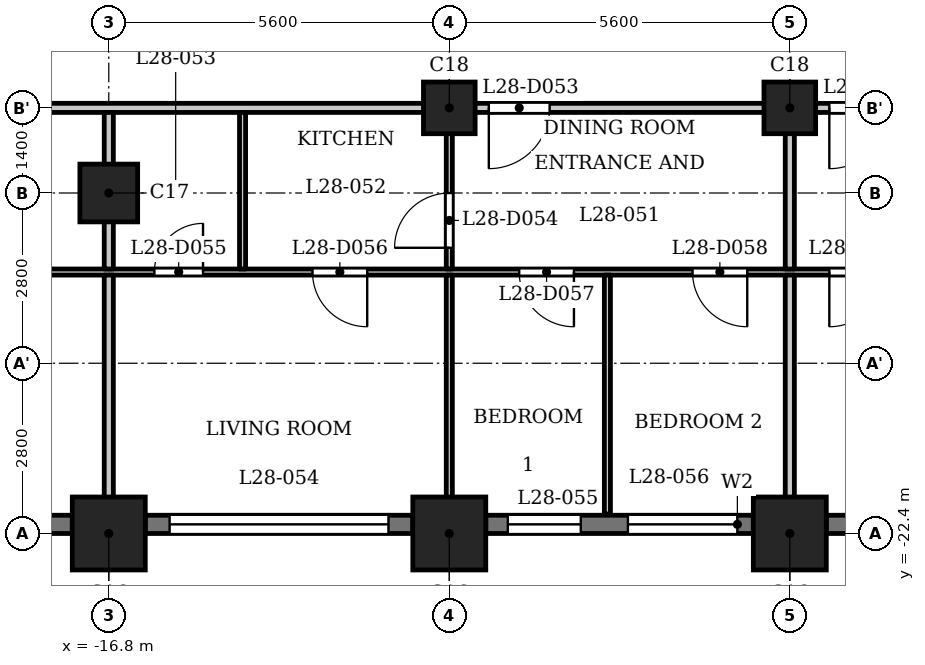
"""IFC4 building model, lengths in metres.
Left out: names, types, materials, properties, quantities, classifications, styles, units other than length and angle.
Written with IfcOpenShell. Run it as: python <this file> out.ifc"""

import sys

from ifc_helpers import new_model, si_unit, direction, frame, frame_2d, origin, origin_2d, place, context, subcontext, project, spatial, rectangle, extrude, element, fill, save


model = new_model("IFC4")
c1 = context("Model", 3, precision=1e-05, world=origin(), true_north=direction((0.0, 1.0)))
c2 = subcontext(c1, "Body", "Model", "MODEL_VIEW")
j1 = project(units=[si_unit("LENGTHUNIT", "METRE"), si_unit("PLANEANGLEUNIT", "RADIAN")], contexts=[c1])
p1 = place(None, origin())
s1 = spatial("IfcSite", under=j1, at=p1, CompositionType="ELEMENT")
p2 = place(p1, origin())
s2 = spatial("IfcBuilding", under=s1, at=p2, CompositionType="ELEMENT")
p3 = place(p2, frame((0.0, 0.0, 111.3)))
s3 = spatial("IfcBuildingStorey", under=s2, at=p3, CompositionType="ELEMENT", Elevation=111.3)
for number, where, z_axis, x_axis in (
    (1, (-16.8, -22.4, 0.0), (0.0, 0.0, 1.0), (1.0, 0.0, 0.0)),
    (2, (-11.2, -22.4, 0.0), (0.0, 0.0, 1.0), (1.0, 0.0, 0.0)),
    (3, (-5.6, -22.4, 0.0), (0.0, 0.0, 1.0), (1.0, 0.0, 0.0)),
):
    element("IfcColumn", number, at=place(p3, frame(where, z_axis=z_axis, x_axis=x_axis)), inside=s3, PredefinedType="COLUMN", context=c2, shape_type="SweptSolid", body=[
        extrude(rectangle(XDim=1.2, YDim=1.2, at=origin_2d()), origin(), (0.0, 0.0, 1.0), 3.5),
    ])
p4 = place(p3, frame((-16.8, -16.8, 0.0), z_axis=(0.0, 0.0, 1.0), x_axis=(1.0, 0.0, 0.0)))
e4 = element("IfcColumn", 4, at=p4, inside=s3, PredefinedType="COLUMN", context=c2, shape_type="SweptSolid", body=[
    extrude(rectangle(XDim=0.95, YDim=0.95, at=origin_2d()), origin(), (0.0, 0.0, 1.0), 3.5),
])
for number, where, z_axis, x_axis in (
    (5, (-11.2, -15.4, 0.0), (0.0, 0.0, 1.0), (1.0, 0.0, 0.0)),
    (6, (-5.6, -15.4, 0.0), (0.0, 0.0, 1.0), (1.0, 0.0, 0.0)),
):
    element("IfcColumn", number, at=place(p3, frame(where, z_axis=z_axis, x_axis=x_axis)), inside=s3, PredefinedType="COLUMN", context=c2, shape_type="SweptSolid", body=[
        extrude(rectangle(XDim=0.85, YDim=0.85, at=origin_2d()), origin(), (0.0, 0.0, 1.0), 3.5),
    ])
p5 = place(p3, frame((-20.0, -22.25, 0.0), z_axis=(0.0, 0.0, 1.0), x_axis=(1.0, 0.0, 0.0)))
e7 = element("IfcWall", 7, at=p5, inside=s3, PredefinedType="SOLIDWALL", context=c2, shape_type="SweptSolid", body=[
    extrude(rectangle(XDim=2.6, YDim=0.3, at=frame_2d((1.3, 0.0))), origin(), (0.0, 0.0, 1.0), 2.4),
])
p6 = place(p5, frame((0.7, 0.0, 0.6)))
e8 = element("IfcOpeningElement", 8, at=p6, cuts=e7, PredefinedType="OPENING", context=c2, shape_type="SweptSolid", body=[
    extrude(rectangle(XDim=1.2, YDim=1.55, at=frame_2d((0.6, 0.775))), frame((0.0, 0.16, 0.0), z_axis=(0.0, -1.0, 0.0), x_axis=(1.0, 0.0, 0.0)), (0.0, 0.0, 1.0), 0.32),
])
p7 = place(p3, frame((-16.2, -22.25, 0.0), z_axis=(0.0, 0.0, 1.0), x_axis=(1.0, 0.0, 0.0)))
e9 = element("IfcWall", 9, at=p7, inside=s3, PredefinedType="SOLIDWALL", context=c2, shape_type="SweptSolid", body=[
    extrude(rectangle(XDim=4.4, YDim=0.3, at=frame_2d((2.2, 0.0))), origin(), (0.0, 0.0, 1.0), 2.4),
])
p8 = place(p7, frame((0.4, 0.0, 1.2)))
e10 = element("IfcOpeningElement", 10, at=p8, cuts=e9, PredefinedType="OPENING", context=c2, shape_type="SweptSolid", body=[
    extrude(rectangle(XDim=3.6, YDim=0.95, at=frame_2d((1.8, 0.475))), frame((0.0, 0.16, 0.0), z_axis=(0.0, -1.0, 0.0), x_axis=(1.0, 0.0, 0.0)), (0.0, 0.0, 1.0), 0.32),
])
p9 = place(p3, frame((-10.6, -22.25, 0.0), z_axis=(0.0, 0.0, 1.0), x_axis=(1.0, 0.0, 0.0)))
e11 = element("IfcWall", 11, at=p9, inside=s3, PredefinedType="SOLIDWALL", context=c2, shape_type="SweptSolid", body=[
    extrude(rectangle(XDim=4.4, YDim=0.3, at=frame_2d((2.2, 0.0))), origin(), (0.0, 0.0, 1.0), 2.4),
])
p10 = place(p9, frame((0.363, 0.0, 0.6)))
e12 = element("IfcOpeningElement", 12, at=p10, cuts=e11, PredefinedType="OPENING", context=c2, shape_type="SweptSolid", body=[
    extrude(rectangle(XDim=1.2, YDim=1.55, at=frame_2d((0.6, 0.775))), frame((0.0, 0.16, 0.0), z_axis=(0.0, -1.0, 0.0), x_axis=(1.0, 0.0, 0.0)), (0.0, 0.0, 1.0), 0.32),
])
p11 = place(p9, frame((2.337, 0.0, 0.9)))
e13 = element("IfcOpeningElement", 13, at=p11, cuts=e11, PredefinedType="OPENING", context=c2, shape_type="SweptSolid", body=[
    extrude(rectangle(XDim=1.8, YDim=1.25, at=frame_2d((0.9, 0.625))), frame((0.0, 0.16, 0.0), z_axis=(0.0, -1.0, 0.0), x_axis=(1.0, 0.0, 0.0)), (0.0, 0.0, 1.0), 0.32),
])
p12 = place(p3, frame((-5.0, -22.25, 0.0), z_axis=(0.0, 0.0, 1.0), x_axis=(1.0, 0.0, 0.0)))
e14 = element("IfcWall", 14, at=p12, inside=s3, PredefinedType="SOLIDWALL", context=c2, shape_type="SweptSolid", body=[
    extrude(rectangle(XDim=4.4, YDim=0.3, at=frame_2d((2.2, 0.0))), origin(), (0.0, 0.0, 1.0), 2.4),
])
p13 = place(p12, frame((0.4, 0.0, 1.2)))
e15 = element("IfcOpeningElement", 15, at=p13, cuts=e14, PredefinedType="OPENING", context=c2, shape_type="SweptSolid", body=[
    extrude(rectangle(XDim=3.6, YDim=0.95, at=frame_2d((1.8, 0.475))), frame((0.0, 0.16, 0.0), z_axis=(0.0, -1.0, 0.0), x_axis=(1.0, 0.0, 0.0)), (0.0, 0.0, 1.0), 0.32),
])
p14 = place(p3, frame((-26.19, -18.1, 0.0), z_axis=(0.0, 0.0, 1.0), x_axis=(1.0, 0.0, 0.0)))
e16 = element("IfcWall", 16, at=p14, inside=s3, PredefinedType="PARTITIONING", context=c2, shape_type="SweptSolid", body=[
    extrude(rectangle(XDim=52.63, YDim=0.1, at=frame_2d((26.315, 0.0))), origin(), (0.0, 0.0, 1.0), 3.2),
])
p15 = place(p14, frame((1.09, 0.0, 0.0)))
e17 = element("IfcOpeningElement", 17, at=p15, cuts=e16, PredefinedType="OPENING", context=c2, shape_type="SweptSolid", body=[
    extrude(rectangle(XDim=0.8, YDim=2.1, at=frame_2d((0.4, 1.05))), frame((0.0, 0.06, 0.0), z_axis=(0.0, -1.0, 0.0), x_axis=(1.0, 0.0, 0.0)), (0.0, 0.0, 1.0), 0.12),
])
p16 = place(p14, frame((4.44, 0.0, 0.0)))
e18 = element("IfcOpeningElement", 18, at=p16, cuts=e16, PredefinedType="OPENING", context=c2, shape_type="SweptSolid", body=[
    extrude(rectangle(XDim=0.9, YDim=2.1, at=frame_2d((0.45, 1.05))), frame((0.0, 0.06, 0.0), z_axis=(0.0, -1.0, 0.0), x_axis=(1.0, 0.0, 0.0)), (0.0, 0.0, 1.0), 0.12),
])
p17 = place(p14, frame((10.14, 0.0, 0.0)))
e19 = element("IfcOpeningElement", 19, at=p17, cuts=e16, PredefinedType="OPENING", context=c2, shape_type="SweptSolid", body=[
    extrude(rectangle(XDim=0.8, YDim=2.1, at=frame_2d((0.4, 1.05))), frame((0.0, 0.06, 0.0), z_axis=(0.0, -1.0, 0.0), x_axis=(1.0, 0.0, 0.0)), (0.0, 0.0, 1.0), 0.12),
])
p18 = place(p14, frame((12.74, 0.0, 0.0)))
e20 = element("IfcOpeningElement", 20, at=p18, cuts=e16, PredefinedType="OPENING", context=c2, shape_type="SweptSolid", body=[
    extrude(rectangle(XDim=0.9, YDim=2.1, at=frame_2d((0.45, 1.05))), frame((0.0, 0.06, 0.0), z_axis=(0.0, -1.0, 0.0), x_axis=(1.0, 0.0, 0.0)), (0.0, 0.0, 1.0), 0.12),
])
p19 = place(p14, frame((16.14, 0.0, 0.0)))
e21 = element("IfcOpeningElement", 21, at=p19, cuts=e16, PredefinedType="OPENING", context=c2, shape_type="SweptSolid", body=[
    extrude(rectangle(XDim=0.9, YDim=2.1, at=frame_2d((0.45, 1.05))), frame((0.0, 0.06, 0.0), z_axis=(0.0, -1.0, 0.0), x_axis=(1.0, 0.0, 0.0)), (0.0, 0.0, 1.0), 0.12),
])
p20 = place(p14, frame((18.99, 0.0, 0.0)))
e22 = element("IfcOpeningElement", 22, at=p20, cuts=e16, PredefinedType="OPENING", context=c2, shape_type="SweptSolid", body=[
    extrude(rectangle(XDim=0.9, YDim=2.1, at=frame_2d((0.45, 1.05))), frame((0.0, 0.06, 0.0), z_axis=(0.0, -1.0, 0.0), x_axis=(1.0, 0.0, 0.0)), (0.0, 0.0, 1.0), 0.12),
])
p21 = place(p14, frame((26.84, 0.0, 0.0)))
e23 = element("IfcOpeningElement", 23, at=p21, cuts=e16, PredefinedType="OPENING", context=c2, shape_type="SweptSolid", body=[
    extrude(rectangle(XDim=0.8, YDim=2.1, at=frame_2d((0.4, 1.05))), frame((0.0, 0.06, 0.0), z_axis=(0.0, -1.0, 0.0), x_axis=(1.0, 0.0, 0.0)), (0.0, 0.0, 1.0), 0.12),
])
p22 = place(p14, frame((21.24, 0.0, 0.0)))
e24 = element("IfcOpeningElement", 24, at=p22, cuts=e16, PredefinedType="OPENING", context=c2, shape_type="SweptSolid", body=[
    extrude(rectangle(XDim=0.9, YDim=2.1, at=frame_2d((0.45, 1.05))), frame((0.0, 0.06, 0.0), z_axis=(0.0, -1.0, 0.0), x_axis=(1.0, 0.0, 0.0)), (0.0, 0.0, 1.0), 0.12),
])
p23 = place(p14, frame((32.54, 0.0, 0.0)))
e25 = element("IfcOpeningElement", 25, at=p23, cuts=e16, PredefinedType="OPENING", context=c2, shape_type="SweptSolid", body=[
    extrude(rectangle(XDim=0.8, YDim=2.1, at=frame_2d((0.4, 1.05))), frame((0.0, 0.06, 0.0), z_axis=(0.0, -1.0, 0.0), x_axis=(1.0, 0.0, 0.0)), (0.0, 0.0, 1.0), 0.12),
])
p24 = place(p14, frame((35.14, 0.0, 0.0)))
e26 = element("IfcOpeningElement", 26, at=p24, cuts=e16, PredefinedType="OPENING", context=c2, shape_type="SweptSolid", body=[
    extrude(rectangle(XDim=0.9, YDim=2.1, at=frame_2d((0.45, 1.05))), frame((0.0, 0.06, 0.0), z_axis=(0.0, -1.0, 0.0), x_axis=(1.0, 0.0, 0.0)), (0.0, 0.0, 1.0), 0.12),
])
p25 = place(p14, frame((38.54, 0.0, 0.0)))
e27 = element("IfcOpeningElement", 27, at=p25, cuts=e16, PredefinedType="OPENING", context=c2, shape_type="SweptSolid", body=[
    extrude(rectangle(XDim=0.9, YDim=2.1, at=frame_2d((0.45, 1.05))), frame((0.0, 0.06, 0.0), z_axis=(0.0, -1.0, 0.0), x_axis=(1.0, 0.0, 0.0)), (0.0, 0.0, 1.0), 0.12),
])
p26 = place(p14, frame((41.39, 0.0, 0.0)))
e28 = element("IfcOpeningElement", 28, at=p26, cuts=e16, PredefinedType="OPENING", context=c2, shape_type="SweptSolid", body=[
    extrude(rectangle(XDim=0.9, YDim=2.1, at=frame_2d((0.45, 1.05))), frame((0.0, 0.06, 0.0), z_axis=(0.0, -1.0, 0.0), x_axis=(1.0, 0.0, 0.0)), (0.0, 0.0, 1.0), 0.12),
])
p27 = place(p14, frame((49.204, 0.0, 0.0)))
e29 = element("IfcOpeningElement", 29, at=p27, cuts=e16, PredefinedType="OPENING", context=c2, shape_type="SweptSolid", body=[
    extrude(rectangle(XDim=0.8, YDim=2.1, at=frame_2d((0.4, 1.05))), frame((0.0, 0.06, 0.0), z_axis=(0.0, -1.0, 0.0), x_axis=(1.0, 0.0, 0.0)), (0.0, 0.0, 1.0), 0.12),
])
p28 = place(p14, frame((43.64, 0.0, 0.0)))
e30 = element("IfcOpeningElement", 30, at=p28, cuts=e16, PredefinedType="OPENING", context=c2, shape_type="SweptSolid", body=[
    extrude(rectangle(XDim=0.9, YDim=2.1, at=frame_2d((0.45, 1.05))), frame((0.0, 0.06, 0.0), z_axis=(0.0, -1.0, 0.0), x_axis=(1.0, 0.0, 0.0)), (0.0, 0.0, 1.0), 0.12),
])
p29 = place(p3, frame((-27.484, -15.4, 0.0), z_axis=(0.0, 0.0, 1.0), x_axis=(1.0, 0.0, 0.0)))
e31 = element("IfcWall", 31, at=p29, inside=s3, PredefinedType="PARTITIONING", context=c2, shape_type="SweptSolid", body=[
    extrude(rectangle(XDim=54.968, YDim=0.15, at=frame_2d((27.484, 0.0))), origin(), (0.0, 0.0, 1.0), 3.2),
])
p30 = place(p29, frame((5.734, 0.0, 0.0)))
e32 = element("IfcOpeningElement", 32, at=p30, cuts=e31, PredefinedType="OPENING", context=c2, shape_type="SweptSolid", body=[
    extrude(rectangle(XDim=1.0, YDim=2.1, at=frame_2d((0.5, 1.05))), frame((0.0, 0.085, 0.0), z_axis=(0.0, -1.0, 0.0), x_axis=(1.0, 0.0, 0.0)), (0.0, 0.0, 1.0), 0.17),
])
p31 = place(p29, frame((16.934, 0.0, 0.0)))
e33 = element("IfcOpeningElement", 33, at=p31, cuts=e31, PredefinedType="OPENING", context=c2, shape_type="SweptSolid", body=[
    extrude(rectangle(XDim=1.0, YDim=2.1, at=frame_2d((0.5, 1.05))), frame((0.0, 0.085, 0.0), z_axis=(0.0, -1.0, 0.0), x_axis=(1.0, 0.0, 0.0)), (0.0, 0.0, 1.0), 0.17),
])
p32 = place(p29, frame((22.534, 0.0, 0.0)))
e34 = element("IfcOpeningElement", 34, at=p32, cuts=e31, PredefinedType="OPENING", context=c2, shape_type="SweptSolid", body=[
    extrude(rectangle(XDim=1.0, YDim=2.1, at=frame_2d((0.5, 1.05))), frame((0.0, 0.085, 0.0), z_axis=(0.0, -1.0, 0.0), x_axis=(1.0, 0.0, 0.0)), (0.0, 0.0, 1.0), 0.17),
])
p33 = place(p29, frame((39.334, 0.0, 0.0)))
e35 = element("IfcOpeningElement", 35, at=p33, cuts=e31, PredefinedType="OPENING", context=c2, shape_type="SweptSolid", body=[
    extrude(rectangle(XDim=1.0, YDim=2.1, at=frame_2d((0.5, 1.05))), frame((0.0, 0.085, 0.0), z_axis=(0.0, -1.0, 0.0), x_axis=(1.0, 0.0, 0.0)), (0.0, 0.0, 1.0), 0.17),
])
p34 = place(p29, frame((44.934, 0.0, 0.0)))
e36 = element("IfcOpeningElement", 36, at=p34, cuts=e31, PredefinedType="OPENING", context=c2, shape_type="SweptSolid", body=[
    extrude(rectangle(XDim=1.0, YDim=2.1, at=frame_2d((0.5, 1.05))), frame((0.0, 0.085, 0.0), z_axis=(0.0, -1.0, 0.0), x_axis=(1.0, 0.0, 0.0)), (0.0, 0.0, 1.0), 0.17),
])
p35 = place(p3, frame((-16.8, -22.98, 0.0), z_axis=(0.0, 0.0, 1.0), x_axis=(0.0, 1.0, 0.0)))
e37 = element("IfcWall", 37, at=p35, inside=s3, PredefinedType="PARTITIONING", context=c2, shape_type="SweptSolid", body=[
    extrude(rectangle(XDim=4.83, YDim=0.15, at=frame_2d((2.415, 0.0))), origin(), (0.0, 0.0, 1.0), 3.2),
])
p36 = place(p3, frame((-16.8, -18.05, 0.0), z_axis=(0.0, 0.0, 1.0), x_axis=(0.0, 1.0, 0.0)))
e38 = element("IfcWall", 38, at=p36, inside=s3, PredefinedType="PARTITIONING", context=c2, shape_type="SweptSolid", body=[
    extrude(rectangle(XDim=2.575, YDim=0.15, at=frame_2d((1.288, 0.0))), origin(), (0.0, 0.0, 1.0), 3.2),
])
p37 = place(p3, frame((-14.6, -18.05, 0.0), z_axis=(0.0, 0.0, 1.0), x_axis=(0.0, 1.0, 0.0)))
e39 = element("IfcWall", 39, at=p37, inside=s3, PredefinedType="PARTITIONING", context=c2, shape_type="SweptSolid", body=[
    extrude(rectangle(XDim=2.575, YDim=0.1, at=frame_2d((1.288, 0.0))), origin(), (0.0, 0.0, 1.0), 3.2),
])
p38 = place(p3, frame((-11.2, -22.98, 0.0), z_axis=(0.0, 0.0, 1.0), x_axis=(0.0, 1.0, 0.0)))
e40 = element("IfcWall", 40, at=p38, inside=s3, PredefinedType="PARTITIONING", context=c2, shape_type="SweptSolid", body=[
    extrude(rectangle(XDim=4.83, YDim=0.1, at=frame_2d((2.415, 0.0))), origin(), (0.0, 0.0, 1.0), 3.2),
])
p39 = place(p3, frame((-11.2, -18.05, 0.0), z_axis=(0.0, 0.0, 1.0), x_axis=(0.0, 1.0, 0.0)))
e41 = element("IfcWall", 41, at=p39, inside=s3, PredefinedType="PARTITIONING", context=c2, shape_type="SweptSolid", body=[
    extrude(rectangle(XDim=2.575, YDim=0.1, at=frame_2d((1.288, 0.0))), origin(), (0.0, 0.0, 1.0), 3.2),
])
p40 = place(p39, frame((0.349, 0.0, 0.0)))
e42 = element("IfcOpeningElement", 42, at=p40, cuts=e41, PredefinedType="OPENING", context=c2, shape_type="SweptSolid", body=[
    extrude(rectangle(XDim=0.9, YDim=2.1, at=frame_2d((0.45, 1.05))), frame((0.0, 0.06, 0.0), z_axis=(0.0, -1.0, 0.0), x_axis=(1.0, 0.0, 0.0)), (0.0, 0.0, 1.0), 0.12),
])
p41 = place(p3, frame((-8.6, -22.08, 0.0), z_axis=(0.0, 0.0, 1.0), x_axis=(0.0, 1.0, 0.0)))
e43 = element("IfcWall", 43, at=p41, inside=s3, PredefinedType="PARTITIONING", context=c2, shape_type="SweptSolid", body=[
    extrude(rectangle(XDim=3.93, YDim=0.1, at=frame_2d((1.965, 0.0))), origin(), (0.0, 0.0, 1.0), 3.2),
])
p42 = place(p3, frame((-5.6, -22.98, 0.0), z_axis=(0.0, 0.0, 1.0), x_axis=(0.0, 1.0, 0.0)))
e44 = element("IfcWall", 44, at=p42, inside=s3, PredefinedType="PARTITIONING", context=c2, shape_type="SweptSolid", body=[
    extrude(rectangle(XDim=4.83, YDim=0.15, at=frame_2d((2.415, 0.0))), origin(), (0.0, 0.0, 1.0), 3.2),
])
p43 = place(p3, frame((-5.6, -18.05, 0.0), z_axis=(0.0, 0.0, 1.0), x_axis=(0.0, 1.0, 0.0)))
e45 = element("IfcWall", 45, at=p43, inside=s3, PredefinedType="PARTITIONING", context=c2, shape_type="SweptSolid", body=[
    extrude(rectangle(XDim=2.575, YDim=0.15, at=frame_2d((1.288, 0.0))), origin(), (0.0, 0.0, 1.0), 3.2),
])
p44 = place(p31, origin())
e46 = element("IfcDoor", 46, at=p44, inside=s3, OperationType="SINGLE_SWING_LEFT", PredefinedType="DOOR", context=c2, shape_type="SweptSolid", body=[
    extrude(rectangle(XDim=1.0, YDim=2.1, at=frame_2d((0.5, 1.05))), frame((0.0, 0.025, 0.0), z_axis=(0.0, -1.0, 0.0), x_axis=(1.0, 0.0, 0.0)), (0.0, 0.0, 1.0), 0.05),
])
fill(e33, e46)
p45 = place(p40, origin())
e47 = element("IfcDoor", 47, at=p45, inside=s3, OperationType="SINGLE_SWING_RIGHT", PredefinedType="DOOR", context=c2, shape_type="SweptSolid", body=[
    extrude(rectangle(XDim=0.9, YDim=2.1, at=frame_2d((0.45, 1.05))), frame((0.0, 0.025, 0.0), z_axis=(0.0, -1.0, 0.0), x_axis=(1.0, 0.0, 0.0)), (0.0, 0.0, 1.0), 0.05),
])
fill(e42, e47)
p46 = place(p17, origin())
e48 = element("IfcDoor", 48, at=p46, inside=s3, OperationType="SINGLE_SWING_LEFT", PredefinedType="DOOR", context=c2, shape_type="SweptSolid", body=[
    extrude(rectangle(XDim=0.8, YDim=2.1, at=frame_2d((0.4, 1.05))), frame((0.0, 0.025, 0.0), z_axis=(0.0, -1.0, 0.0), x_axis=(1.0, 0.0, 0.0)), (0.0, 0.0, 1.0), 0.05),
])
fill(e19, e48)
p47 = place(p18, origin())
e49 = element("IfcDoor", 49, at=p47, inside=s3, OperationType="SINGLE_SWING_RIGHT", PredefinedType="DOOR", context=c2, shape_type="SweptSolid", body=[
    extrude(rectangle(XDim=0.9, YDim=2.1, at=frame_2d((0.45, 1.05))), frame((0.0, 0.025, 0.0), z_axis=(0.0, -1.0, 0.0), x_axis=(1.0, 0.0, 0.0)), (0.0, 0.0, 1.0), 0.05),
])
fill(e20, e49)
p48 = place(p19, origin())
e50 = element("IfcDoor", 50, at=p48, inside=s3, OperationType="SINGLE_SWING_RIGHT", PredefinedType="DOOR", context=c2, shape_type="SweptSolid", body=[
    extrude(rectangle(XDim=0.9, YDim=2.1, at=frame_2d((0.45, 1.05))), frame((0.0, 0.025, 0.0), z_axis=(0.0, -1.0, 0.0), x_axis=(1.0, 0.0, 0.0)), (0.0, 0.0, 1.0), 0.05),
])
fill(e21, e50)
p49 = place(p20, origin())
e51 = element("IfcDoor", 51, at=p49, inside=s3, OperationType="SINGLE_SWING_RIGHT", PredefinedType="DOOR", context=c2, shape_type="SweptSolid", body=[
    extrude(rectangle(XDim=0.9, YDim=2.1, at=frame_2d((0.45, 1.05))), frame((0.0, 0.025, 0.0), z_axis=(0.0, -1.0, 0.0), x_axis=(1.0, 0.0, 0.0)), (0.0, 0.0, 1.0), 0.05),
])
fill(e22, e51)
p50 = place(p32, origin())
e52 = element("IfcDoor", 52, at=p50, inside=s3, OperationType="SINGLE_SWING_LEFT", PredefinedType="DOOR", context=c2, shape_type="SweptSolid", body=[
    extrude(rectangle(XDim=1.0, YDim=2.1, at=frame_2d((0.5, 1.05))), frame((0.0, 0.025, 0.0), z_axis=(0.0, -1.0, 0.0), x_axis=(1.0, 0.0, 0.0)), (0.0, 0.0, 1.0), 0.05),
])
fill(e34, e52)
p51 = place(p22, origin())
e53 = element("IfcDoor", 53, at=p51, inside=s3, OperationType="SINGLE_SWING_LEFT", PredefinedType="DOOR", context=c2, shape_type="SweptSolid", body=[
    extrude(rectangle(XDim=0.9, YDim=2.1, at=frame_2d((0.45, 1.05))), frame((0.0, 0.025, 0.0), z_axis=(0.0, -1.0, 0.0), x_axis=(1.0, 0.0, 0.0)), (0.0, 0.0, 1.0), 0.05),
])
fill(e24, e53)
p52 = place(p8, origin())
e54 = element("IfcWindow", 54, at=p52, inside=s3, PartitioningType="SINGLE_PANEL", PredefinedType="WINDOW", context=c2, shape_type="SweptSolid", body=[
    extrude(rectangle(XDim=3.6, YDim=0.95, at=frame_2d((1.8, 0.475))), frame((0.0, 0.03, 0.0), z_axis=(0.0, -1.0, 0.0), x_axis=(1.0, 0.0, 0.0)), (0.0, 0.0, 1.0), 0.06),
])
fill(e10, e54)
p53 = place(p10, origin())
e55 = element("IfcWindow", 55, at=p53, inside=s3, PartitioningType="SINGLE_PANEL", PredefinedType="WINDOW", context=c2, shape_type="SweptSolid", body=[
    extrude(rectangle(XDim=1.2, YDim=1.55, at=frame_2d((0.6, 0.775))), frame((0.0, 0.03, 0.0), z_axis=(0.0, -1.0, 0.0), x_axis=(1.0, 0.0, 0.0)), (0.0, 0.0, 1.0), 0.06),
])
fill(e12, e55)
p54 = place(p11, origin())
e56 = element("IfcWindow", 56, at=p54, inside=s3, PartitioningType="SINGLE_PANEL", PredefinedType="WINDOW", context=c2, shape_type="SweptSolid", body=[
    extrude(rectangle(XDim=1.8, YDim=1.25, at=frame_2d((0.9, 0.625))), frame((0.0, 0.03, 0.0), z_axis=(0.0, -1.0, 0.0), x_axis=(1.0, 0.0, 0.0)), (0.0, 0.0, 1.0), 0.06),
])
fill(e13, e56)
save(model, sys.argv[1])
